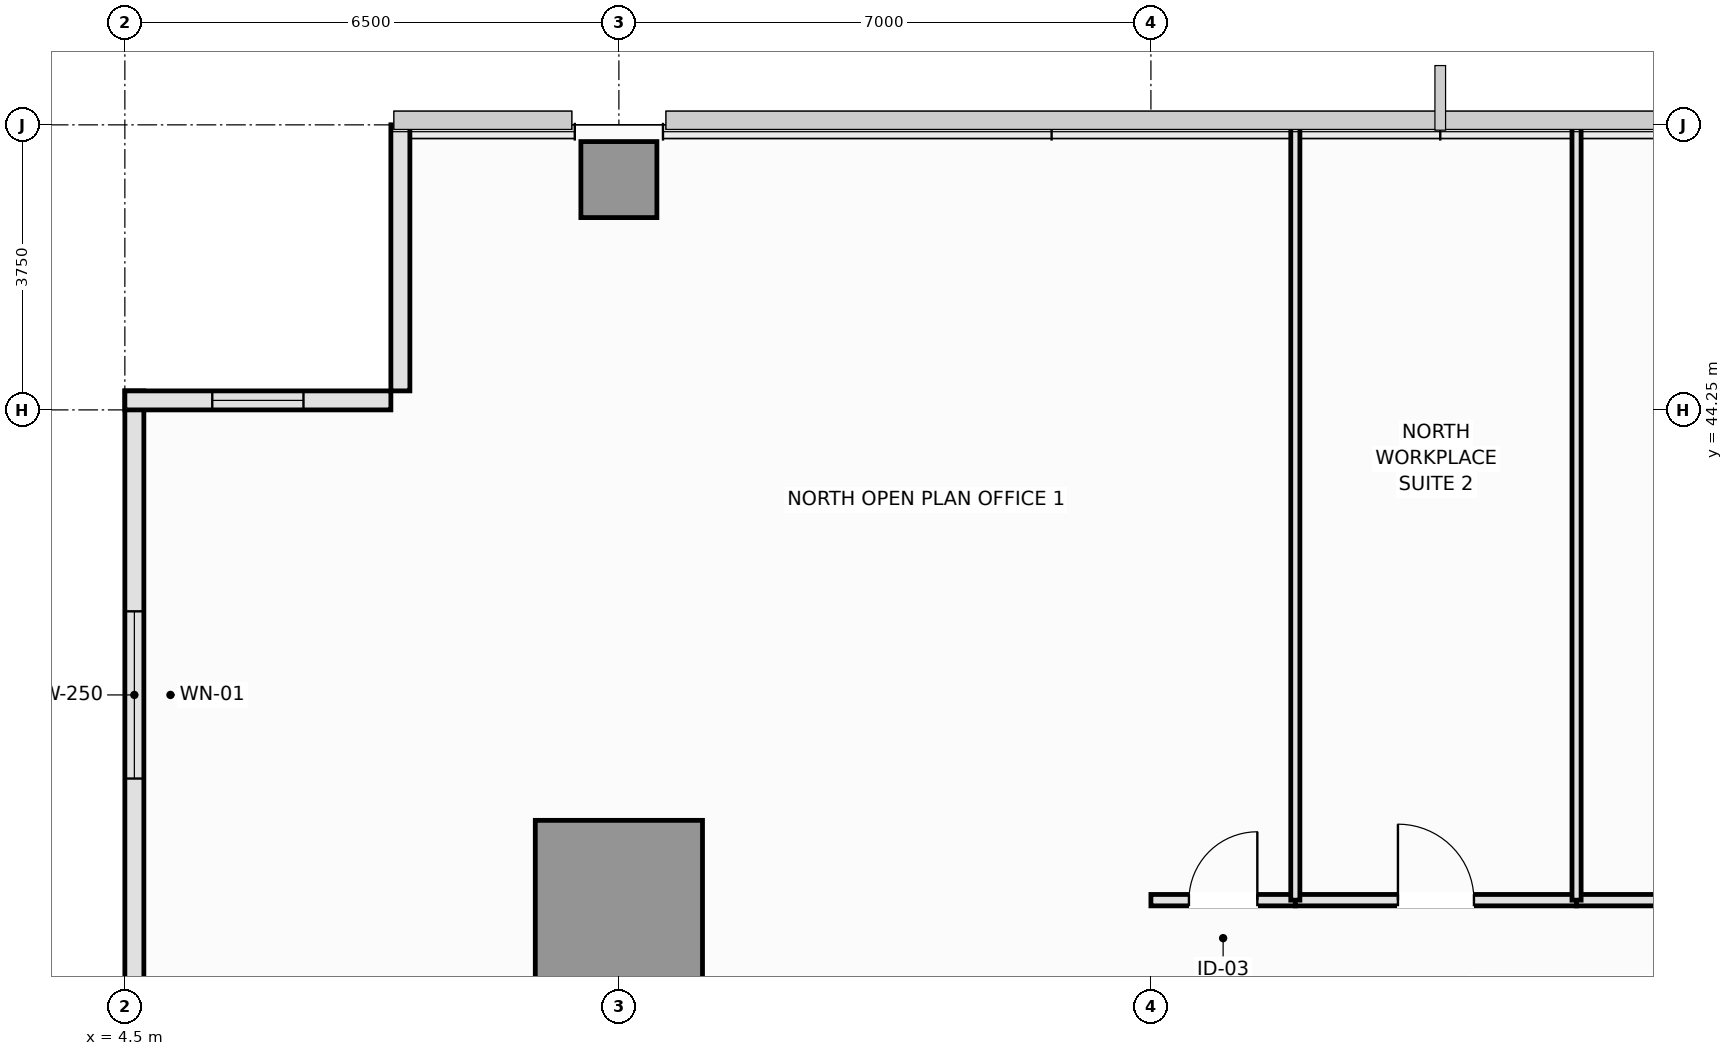
"""IFC4 building model, lengths in metres.
Left out: names, types, materials, properties, quantities, classifications, styles, units other than length and angle.
Written with IfcOpenShell. Run it as: python <this file> out.ifc"""

import sys

from ifc_helpers import new_model, si_unit, direction, frame, frame_2d, origin, origin_2d, place, context, subcontext, project, spatial, rectangle, extrude, element, fill, save


model = new_model("IFC4")
c1 = context("Model", 3, precision=1e-05, world=origin(), true_north=direction((0.0, 1.0)))
c2 = subcontext(c1, "Body", "Model", "MODEL_VIEW")
j1 = project(units=[si_unit("LENGTHUNIT", "METRE"), si_unit("PLANEANGLEUNIT", "RADIAN")], contexts=[c1])
p1 = place(None, origin())
s1 = spatial("IfcSite", under=j1, at=p1, CompositionType="ELEMENT")
p2 = place(p1, origin())
s2 = spatial("IfcBuilding", under=s1, at=p2, CompositionType="ELEMENT")
p3 = place(p2, frame((0.0, 0.0, 57.55)))
s3 = spatial("IfcBuildingStorey", under=s2, at=p3, CompositionType="ELEMENT", Elevation=57.55)
p4 = place(p3, frame((11.0, 37.75, 0.0), z_axis=(0.0, 0.0, 1.0), x_axis=(1.0, 0.0, 0.0)))
e1 = element("IfcColumn", 1, at=p4, inside=s3, PredefinedType="COLUMN", context=c2, shape_type="SweptSolid", body=[
    extrude(rectangle(XDim=2.2, YDim=2.2, at=origin_2d()), origin(), (0.0, 0.0, 1.0), 3.55),
])
p5 = place(p3, frame((11.0, 47.28, 0.0), z_axis=(0.0, 0.0, 1.0), x_axis=(1.0, 0.0, 0.0)))
e2 = element("IfcColumn", 2, at=p5, inside=s3, PredefinedType="COLUMN", context=c2, shape_type="SweptSolid", body=[
    extrude(rectangle(XDim=1.0, YDim=1.0, at=origin_2d()), origin(), (0.0, 0.0, 1.0), 3.55),
])
p6 = place(p3, frame((4.625, 44.5, 0.0), z_axis=(0.0, 0.0, 1.0), x_axis=(0.0, -1.0, 0.0)))
e3 = element("IfcWall", 3, at=p6, inside=s3, PredefinedType="SOLIDWALL", context=c2, shape_type="SweptSolid", body=[
    extrude(rectangle(XDim=8.0, YDim=0.25, at=frame_2d((4.0, 0.0))), origin(), (0.0, 0.0, 1.0), 3.37),
])
p7 = place(p6, frame((2.9, 0.0, 0.9)))
e4 = element("IfcOpeningElement", 4, at=p7, cuts=e3, PredefinedType="OPENING", context=c2, shape_type="SweptSolid", body=[
    extrude(rectangle(XDim=2.2, YDim=1.8, at=frame_2d((1.1, 0.9))), frame((0.0, 0.135, 0.0), z_axis=(0.0, -1.0, 0.0), x_axis=(1.0, 0.0, 0.0)), (0.0, 0.0, 1.0), 0.27),
])
p8 = place(p3, frame((8.125, 48.0, 0.0), z_axis=(0.0, 0.0, 1.0), x_axis=(0.0, -1.0, 0.0)))
e5 = element("IfcWall", 5, at=p8, inside=s3, PredefinedType="SOLIDWALL", context=c2, shape_type="SweptSolid", body=[
    extrude(rectangle(XDim=3.5, YDim=0.25, at=frame_2d((1.75, 0.0))), origin(), (0.0, 0.0, 1.0), 3.37),
])
p9 = place(p3, frame((8.0, 44.375, 0.0), z_axis=(0.0, 0.0, 1.0), x_axis=(-1.0, 0.0, 0.0)))
e6 = element("IfcWall", 6, at=p9, inside=s3, PredefinedType="SOLIDWALL", context=c2, shape_type="SweptSolid", body=[
    extrude(rectangle(XDim=3.5, YDim=0.25, at=frame_2d((1.75, 0.0))), origin(), (0.0, 0.0, 1.0), 3.37),
])
p10 = place(p9, frame((1.15, 0.0, 0.9)))
e7 = element("IfcOpeningElement", 7, at=p10, cuts=e6, PredefinedType="OPENING", context=c2, shape_type="SweptSolid", body=[
    extrude(rectangle(XDim=1.2, YDim=1.8, at=frame_2d((0.6, 0.9))), frame((0.0, 0.135, 0.0), z_axis=(0.0, -1.0, 0.0), x_axis=(1.0, 0.0, 0.0)), (0.0, 0.0, 1.0), 0.27),
])
p11 = place(p3, frame((18.0, 37.8, 0.0), z_axis=(0.0, 0.0, 1.0), x_axis=(1.0, 0.0, 0.0)))
e8 = element("IfcWall", 8, at=p11, inside=s3, PredefinedType="PARTITIONING", context=c2, shape_type="SweptSolid", body=[
    extrude(rectangle(XDim=1.9, YDim=0.15, at=frame_2d((0.95, 0.0))), origin(), (0.0, 0.0, 1.0), 2.72),
])
p12 = place(p11, frame((0.5, 0.0, 0.0)))
e9 = element("IfcOpeningElement", 9, at=p12, cuts=e8, PredefinedType="OPENING", context=c2, shape_type="SweptSolid", body=[
    extrude(rectangle(XDim=0.9, YDim=2.1, at=frame_2d((0.45, 1.05))), frame((0.0, 0.085, 0.0), z_axis=(0.0, -1.0, 0.0), x_axis=(1.0, 0.0, 0.0)), (0.0, 0.0, 1.0), 0.17),
])
p13 = place(p3, frame((19.9, 37.8, 0.0), z_axis=(0.0, 0.0, 1.0), x_axis=(1.0, 0.0, 0.0)))
e10 = element("IfcWall", 10, at=p13, inside=s3, PredefinedType="PARTITIONING", context=c2, shape_type="SweptSolid", body=[
    extrude(rectangle(XDim=3.7, YDim=0.15, at=frame_2d((1.85, 0.0))), origin(), (0.0, 0.0, 1.0), 2.72),
])
p14 = place(p13, frame((1.35, 0.0, 0.0)))
e11 = element("IfcOpeningElement", 11, at=p14, cuts=e10, PredefinedType="OPENING", context=c2, shape_type="SweptSolid", body=[
    extrude(rectangle(XDim=1.0, YDim=2.15, at=frame_2d((0.5, 1.075))), frame((0.0, 0.085, 0.0), z_axis=(0.0, -1.0, 0.0), x_axis=(1.0, 0.0, 0.0)), (0.0, 0.0, 1.0), 0.17),
])
p15 = place(p3, frame((23.6, 37.8, 0.0), z_axis=(0.0, 0.0, 1.0), x_axis=(1.0, 0.0, 0.0)))
e12 = element("IfcWall", 12, at=p15, inside=s3, PredefinedType="PARTITIONING", context=c2, shape_type="SweptSolid", body=[
    extrude(rectangle(XDim=3.9, YDim=0.15, at=frame_2d((1.95, 0.0))), origin(), (0.0, 0.0, 1.0), 2.72),
])
p16 = place(p15, frame((1.45, 0.0, 0.0)))
e13 = element("IfcOpeningElement", 13, at=p16, cuts=e12, PredefinedType="OPENING", context=c2, shape_type="SweptSolid", body=[
    extrude(rectangle(XDim=1.0, YDim=2.15, at=frame_2d((0.5, 1.075))), frame((0.0, 0.085, 0.0), z_axis=(0.0, -1.0, 0.0), x_axis=(1.0, 0.0, 0.0)), (0.0, 0.0, 1.0), 0.17),
])
for number, where, z_axis, x_axis in (
    (14, (19.9, 37.8, 0.0), (0.0, 0.0, 1.0), (0.0, 1.0, 0.0)),
    (15, (23.6, 37.8, 0.0), (0.0, 0.0, 1.0), (0.0, 1.0, 0.0)),
):
    element("IfcWall", number, at=place(p3, frame(where, z_axis=z_axis, x_axis=x_axis)), inside=s3, PredefinedType="PARTITIONING", context=c2, shape_type="SweptSolid", body=[
        extrude(rectangle(XDim=10.19, YDim=0.12, at=frame_2d((5.095, 0.0))), origin(), (0.0, 0.0, 1.0), 3.37),
    ])
p17 = place(p7, origin())
e16 = element("IfcWindow", 16, at=p17, inside=s3, PartitioningType="SINGLE_PANEL", PredefinedType="WINDOW", context=c2, shape_type="SweptSolid", body=[
    extrude(rectangle(XDim=2.2, YDim=1.8, at=frame_2d((1.1, 0.9))), frame((0.0, 0.03, 0.0), z_axis=(0.0, -1.0, 0.0), x_axis=(1.0, 0.0, 0.0)), (0.0, 0.0, 1.0), 0.06),
])
fill(e4, e16)
p18 = place(p10, origin())
e17 = element("IfcWindow", 17, at=p18, inside=s3, PartitioningType="SINGLE_PANEL", PredefinedType="WINDOW", context=c2, shape_type="SweptSolid", body=[
    extrude(rectangle(XDim=1.2, YDim=1.8, at=frame_2d((0.6, 0.9))), frame((0.0, 0.03, 0.0), z_axis=(0.0, -1.0, 0.0), x_axis=(1.0, 0.0, 0.0)), (0.0, 0.0, 1.0), 0.06),
])
fill(e7, e17)
p19 = place(p12, origin())
e18 = element("IfcDoor", 18, at=p19, inside=s3, OperationType="SINGLE_SWING_RIGHT", PredefinedType="DOOR", context=c2, shape_type="SweptSolid", body=[
    extrude(rectangle(XDim=0.9, YDim=2.1, at=frame_2d((0.45, 1.05))), frame((0.0, 0.025, 0.0), z_axis=(0.0, -1.0, 0.0), x_axis=(1.0, 0.0, 0.0)), (0.0, 0.0, 1.0), 0.05),
])
fill(e9, e18)
p20 = place(p14, origin())
e19 = element("IfcDoor", 19, at=p20, inside=s3, OperationType="SINGLE_SWING_LEFT", PredefinedType="DOOR", context=c2, shape_type="SweptSolid", body=[
    extrude(rectangle(XDim=1.0, YDim=2.15, at=frame_2d((0.5, 1.075))), frame((0.0, 0.025, 0.0), z_axis=(0.0, -1.0, 0.0), x_axis=(1.0, 0.0, 0.0)), (0.0, 0.0, 1.0), 0.05),
])
fill(e11, e19)
save(model, sys.argv[1])
